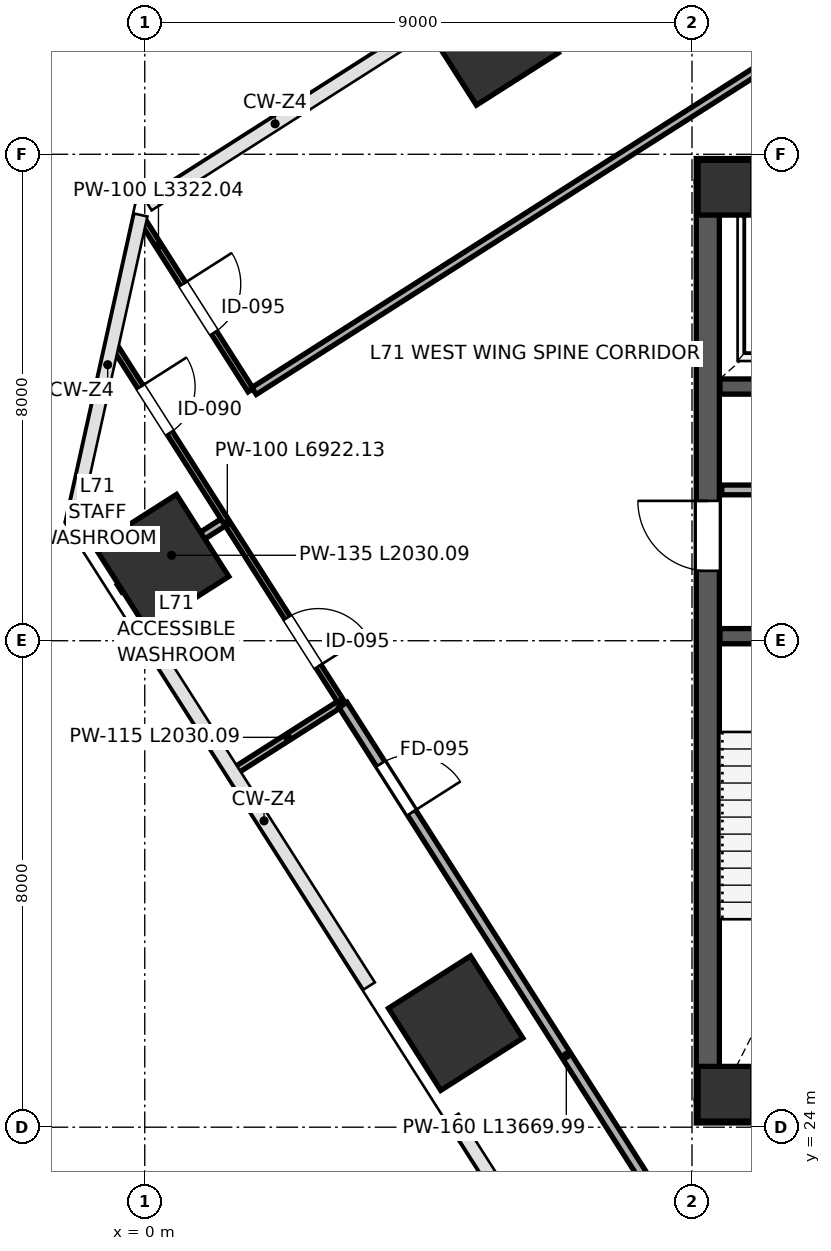
"""IFC4 building model, lengths in metres.
Left out: names, types, materials, properties, quantities, classifications, styles, units other than length and angle.
Written with IfcOpenShell. Run it as: python <this file> out.ifc"""

import sys

from ifc_helpers import new_model, si_unit, direction, frame, frame_2d, origin, origin_2d, place, context, subcontext, project, spatial, rectangle, extrude, source, transform, mapped, element, fill, save


model = new_model("IFC4")
c1 = context("Model", 3, precision=1e-05, world=origin(), true_north=direction((0.0, 1.0)))
c2 = subcontext(c1, "Body", "Model", "MODEL_VIEW")
j1 = project(units=[si_unit("LENGTHUNIT", "METRE"), si_unit("PLANEANGLEUNIT", "RADIAN")], contexts=[c1])
p1 = place(None, origin())
s1 = spatial("IfcSite", under=j1, at=p1, CompositionType="ELEMENT")
p2 = place(p1, origin())
s2 = spatial("IfcBuilding", under=s1, at=p2, CompositionType="ELEMENT")
p3 = place(p2, frame((0.0, 0.0, 315.6)))
s3 = spatial("IfcBuildingStorey", under=s2, at=p3, CompositionType="ELEMENT", Elevation=315.6)
m1 = source(origin(), c2, "Body", "SweptSolid", [
    extrude(rectangle(XDim=0.9, YDim=0.9, at=origin_2d()), origin(), (0.0, 0.0, 1.0), 4.198),
])
for number, where, z_axis, x_axis in (
    (1, (9.55, 24.55, 0.001), (0.0, 0.0, 1.0), (1.0, 0.0, 0.0)),
    (2, (9.55, 39.45, 0.001), (0.0, 0.0, 1.0), (1.0, 0.0, 0.0)),
):
    element("IfcColumn", number, at=place(p3, frame(where, z_axis=z_axis, x_axis=x_axis)), inside=s3, PredefinedType="COLUMN", context=c2, shape_type="MappedRepresentation", body=[
        mapped(m1, transform((0.0, 0.0, 0.0), scale=1.0)),
    ])
m2 = source(origin(), c2, "Body", "SweptSolid", [
    extrude(rectangle(XDim=1.6, YDim=1.6, at=origin_2d()), origin(), (0.0, 0.0, 1.0), 4.198),
])
for number, where, z_axis, x_axis in (
    (3, (0.277, 33.301, 0.001), (0.0, 0.0, 1.0), (-0.537, 0.843, 0.0)),
    (4, (5.113, 25.71, 0.001), (0.0, 0.0, 1.0), (-0.537, 0.843, 0.0)),
    (5, (5.699, 41.913, 0.001), (0.0, 0.0, 1.0), (-0.537, 0.843, 0.0)),
):
    element("IfcColumn", number, at=place(p3, frame(where, z_axis=z_axis, x_axis=x_axis)), inside=s3, PredefinedType="COLUMN", context=c2, shape_type="MappedRepresentation", body=[
        mapped(m2, transform((0.0, 0.0, 0.0), scale=1.0)),
    ])
p4 = place(p3, frame((9.26, 24.45, 0.0), z_axis=(0.0, 0.0, 1.0), x_axis=(0.0, 1.0, 0.0)))
e6 = element("IfcWall", 6, at=p4, inside=s3, PredefinedType="SHEAR", context=c2, shape_type="SweptSolid", body=[
    extrude(rectangle(XDim=15.1, YDim=0.38, at=frame_2d((7.55, 0.0))), origin(), (0.0, 0.0, 1.0), 3.96),
])
p5 = place(p4, frame((8.7, 0.0, 0.0)))
e7 = element("IfcOpeningElement", 7, at=p5, cuts=e6, PredefinedType="OPENING", context=c2, shape_type="SweptSolid", body=[
    extrude(rectangle(XDim=1.15, YDim=2.2, at=frame_2d((0.575, 1.1))), frame((0.0, 0.2, 0.0), z_axis=(0.0, -1.0, 0.0), x_axis=(1.0, 0.0, 0.0)), (0.0, 0.0, 1.0), 0.4),
])
for number, where, z_axis, x_axis in (
    (8, (9.07, 24.26, 0.0), (0.0, 0.0, 1.0), (1.0, 0.0, 0.0)),
    (9, (9.07, 39.74, 0.0), (0.0, 0.0, 1.0), (1.0, 0.0, 0.0)),
):
    element("IfcWall", number, at=place(p3, frame(where, z_axis=z_axis, x_axis=x_axis)), inside=s3, PredefinedType="SHEAR", context=c2, shape_type="SweptSolid", body=[
        extrude(rectangle(XDim=17.86, YDim=0.38, at=frame_2d((8.93, 0.0))), origin(), (0.0, 0.0, 1.0), 3.96),
    ])
p6 = place(p3, frame((9.46, 32.075, 0.0), z_axis=(0.0, 0.0, 1.0), x_axis=(1.0, 0.0, 0.0)))
e10 = element("IfcWall", 10, at=p6, inside=s3, PredefinedType="SHEAR", context=c2, shape_type="SweptSolid", body=[
    extrude(rectangle(XDim=3.29, YDim=0.25, at=frame_2d((1.645, 0.0))), origin(), (0.0, 0.0, 1.0), 3.96),
])
p7 = place(p3, frame((9.46, 36.18, 0.0), z_axis=(0.0, 0.0, 1.0), x_axis=(1.0, 0.0, 0.0)))
e11 = element("IfcWall", 11, at=p7, inside=s3, PredefinedType="SHEAR", context=c2, shape_type="SweptSolid", body=[
    extrude(rectangle(XDim=3.79, YDim=0.25, at=frame_2d((1.895, 0.0))), origin(), (0.0, 0.0, 1.0), 3.96),
])
p8 = place(p7, frame((2.62, 0.0, 0.0)))
e12 = element("IfcOpeningElement", 12, at=p8, cuts=e11, PredefinedType="OPENING", context=c2, shape_type="SweptSolid", body=[
    extrude(rectangle(XDim=0.85, YDim=2.1, at=frame_2d((0.425, 1.05))), frame((0.0, 0.135, 0.0), z_axis=(0.0, -1.0, 0.0), x_axis=(1.0, 0.0, 0.0)), (0.0, 0.0, 1.0), 0.27),
])
p9 = place(p7, frame((0.85, 0.0, 0.0)))
e13 = element("IfcOpeningElement", 13, at=p9, cuts=e11, PredefinedType="OPENING", context=c2, shape_type="SweptSolid", body=[
    extrude(rectangle(XDim=1.3, YDim=2.25, at=frame_2d((0.65, 1.125))), frame((0.0, 0.135, 0.0), z_axis=(0.0, -1.0, 0.0), x_axis=(1.0, 0.0, 0.0)), (0.0, 0.0, 1.0), 0.27),
])
p10 = place(p3, frame((9.49, 34.48, 0.0), z_axis=(0.0, 0.0, 1.0), x_axis=(1.0, 0.0, 0.0)))
e14 = element("IfcWall", 14, at=p10, inside=s3, PredefinedType="PARTITIONING", context=c2, shape_type="SweptSolid", body=[
    extrude(rectangle(XDim=3.7, YDim=0.16, at=frame_2d((1.85, 0.0))), origin(), (0.0, 0.0, 1.0), 3.96),
])
p11 = place(p10, frame((1.15, 0.0, 0.0)))
e15 = element("IfcOpeningElement", 15, at=p11, cuts=e14, PredefinedType="OPENING", context=c2, shape_type="SweptSolid", body=[
    extrude(rectangle(XDim=0.9, YDim=2.15, at=frame_2d((0.45, 1.075))), frame((0.0, 0.09, 0.0), z_axis=(0.0, -1.0, 0.0), x_axis=(1.0, 0.0, 0.0)), (0.0, 0.0, 1.0), 0.18),
])
p12 = place(p3, frame((-0.414, 32.86, 0.0), z_axis=(0.0, 0.0, 1.0), x_axis=(0.843468317829, 0.5371789244, 0.0)))
e16 = element("IfcWall", 16, at=p12, inside=s3, PredefinedType="PARTITIONING", context=c2, shape_type="SweptSolid", body=[
    extrude(rectangle(XDim=2.03, YDim=0.135, at=frame_2d((1.015, 0.0))), origin(), (0.0, 0.0, 1.0), 3.295),
])
p13 = place(p3, frame((1.493, 29.866, 0.0), z_axis=(0.0, 0.0, 1.0), x_axis=(0.843433611632, 0.537233415537, 0.0)))
e17 = element("IfcWall", 17, at=p13, inside=s3, PredefinedType="PARTITIONING", context=c2, shape_type="SweptSolid", body=[
    extrude(rectangle(XDim=2.03, YDim=0.115, at=frame_2d((1.015, 0.0))), origin(), (0.0, 0.0, 1.0), 3.295),
])
p14 = place(p3, frame((-0.502, 36.85, 0.0), z_axis=(0.0, 0.0, 1.0), x_axis=(0.537309039539, -0.843385437407, 0.0)))
e18 = element("IfcWall", 18, at=p14, inside=s3, PredefinedType="PARTITIONING", context=c2, shape_type="SweptSolid", body=[
    extrude(rectangle(XDim=6.922, YDim=0.1, at=frame_2d((3.461, 0.0))), origin(), (0.0, 0.0, 1.0), 3.96),
])
p15 = place(p14, frame((0.8, 0.0, 0.0)))
e19 = element("IfcOpeningElement", 19, at=p15, cuts=e18, PredefinedType="OPENING", context=c2, shape_type="SweptSolid", body=[
    extrude(rectangle(XDim=0.9, YDim=2.15, at=frame_2d((0.45, 1.075))), frame((0.0, 0.06, 0.0), z_axis=(0.0, -1.0, 0.0), x_axis=(1.0, 0.0, 0.0)), (0.0, 0.0, 1.0), 0.12),
])
p16 = place(p14, frame((5.3, 0.0, 0.0)))
e20 = element("IfcOpeningElement", 20, at=p16, cuts=e18, PredefinedType="OPENING", context=c2, shape_type="SweptSolid", body=[
    extrude(rectangle(XDim=0.95, YDim=2.15, at=frame_2d((0.475, 1.075))), frame((0.0, 0.06, 0.0), z_axis=(0.0, -1.0, 0.0), x_axis=(1.0, 0.0, 0.0)), (0.0, 0.0, 1.0), 0.12),
])
p17 = place(p3, frame((3.26, 30.945, 0.0), z_axis=(0.0, 0.0, 1.0), x_axis=(0.537307625317, -0.843386338386, 0.0)))
e21 = element("IfcWall", 21, at=p17, inside=s3, PredefinedType="PARTITIONING", context=c2, shape_type="SweptSolid", body=[
    extrude(rectangle(XDim=13.67, YDim=0.16, at=frame_2d((6.835, 0.0))), origin(), (0.0, 0.0, 1.0), 3.96),
])
p18 = place(p17, frame((1.15, 0.0, 0.0)))
e22 = element("IfcOpeningElement", 22, at=p18, cuts=e21, PredefinedType="OPENING", context=c2, shape_type="SweptSolid", body=[
    extrude(rectangle(XDim=0.95, YDim=2.15, at=frame_2d((0.475, 1.075))), frame((0.0, 0.09, 0.0), z_axis=(0.0, -1.0, 0.0), x_axis=(1.0, 0.0, 0.0)), (0.0, 0.0, 1.0), 0.18),
])
p19 = place(p3, frame((-0.042, 38.921, 0.0), z_axis=(0.0, 0.0, 1.0), x_axis=(0.537298651026, -0.843392055693, 0.0)))
e23 = element("IfcWall", 23, at=p19, inside=s3, PredefinedType="PARTITIONING", context=c2, shape_type="SweptSolid", body=[
    extrude(rectangle(XDim=3.322, YDim=0.1, at=frame_2d((1.661, 0.0))), origin(), (0.0, 0.0, 1.0), 3.96),
])
p20 = place(p19, frame((1.25, 0.0, 0.0)))
e24 = element("IfcOpeningElement", 24, at=p20, cuts=e23, PredefinedType="OPENING", context=c2, shape_type="SweptSolid", body=[
    extrude(rectangle(XDim=0.95, YDim=2.15, at=frame_2d((0.475, 1.075))), frame((0.0, 0.06, 0.0), z_axis=(0.0, -1.0, 0.0), x_axis=(1.0, 0.0, 0.0)), (0.0, 0.0, 1.0), 0.12),
])
p21 = place(p3, frame((1.798, 36.107, 0.0), z_axis=(0.0, 0.0, 1.0), x_axis=(0.843396745572, 0.537291289301, 0.0)))
e25 = element("IfcWall", 25, at=p21, inside=s3, PredefinedType="PARTITIONING", context=c2, shape_type="SweptSolid", body=[
    extrude(rectangle(XDim=17.17, YDim=0.135, at=frame_2d((8.585, 0.0))), origin(), (0.0, 0.0, 1.0), 3.96),
])
p22 = place(p3, frame((9.687, 17.004, 0.0), z_axis=(0.0, 0.0, 1.0), x_axis=(0.843392646996, 0.537297722862, 0.0)))
e26 = element("IfcWall", 26, at=p22, inside=s3, PredefinedType="PARTITIONING", context=c2, shape_type="SweptSolid", body=[
    extrude(rectangle(XDim=12.831, YDim=0.16, at=frame_2d((6.416, 0.0))), origin(), (0.0, 0.0, 1.0), 3.96),
])
m3 = source(origin(), c2, "Body", "SweptSolid", [
    extrude(rectangle(XDim=1.15, YDim=2.2, at=frame_2d((0.575, 1.1))), frame((0.0, 0.025, 0.0), z_axis=(0.0, -1.0, 0.0), x_axis=(1.0, 0.0, 0.0)), (0.0, 0.0, 1.0), 0.05),
])
p23 = place(p5, origin())
e27 = element("IfcDoor", 27, at=p23, inside=s3, OperationType="SINGLE_SWING_RIGHT", PredefinedType="DOOR", context=c2, shape_type="MappedRepresentation", body=[
    mapped(m3, transform((0.0, 0.0, 0.0), scale=1.0)),
])
fill(e7, e27)
m4 = source(origin(), c2, "Body", "SweptSolid", [
    extrude(rectangle(XDim=0.9, YDim=2.15, at=frame_2d((0.45, 1.075))), frame((0.0, 0.025, 0.0), z_axis=(0.0, -1.0, 0.0), x_axis=(1.0, 0.0, 0.0)), (0.0, 0.0, 1.0), 0.05),
])
p24 = place(p15, origin())
e28 = element("IfcDoor", 28, at=p24, inside=s3, OperationType="SINGLE_SWING_LEFT", PredefinedType="DOOR", context=c2, shape_type="MappedRepresentation", body=[
    mapped(m4, transform((0.0, 0.0, 0.0), scale=1.0)),
])
fill(e19, e28)
m5 = source(origin(), c2, "Body", "SweptSolid", [
    extrude(rectangle(XDim=0.95, YDim=2.15, at=frame_2d((0.475, 1.075))), frame((0.0, 0.025, 0.0), z_axis=(0.0, -1.0, 0.0), x_axis=(1.0, 0.0, 0.0)), (0.0, 0.0, 1.0), 0.05),
])
p25 = place(p16, origin())
e29 = element("IfcDoor", 29, at=p25, inside=s3, OperationType="SINGLE_SWING_RIGHT", PredefinedType="DOOR", context=c2, shape_type="MappedRepresentation", body=[
    mapped(m5, transform((0.0, 0.0, 0.0), scale=1.0)),
])
fill(e20, e29)
m6 = source(origin(), c2, "Body", "SweptSolid", [
    extrude(rectangle(XDim=0.95, YDim=2.15, at=frame_2d((0.475, 1.075))), frame((0.0, 0.025, 0.0), z_axis=(0.0, -1.0, 0.0), x_axis=(1.0, 0.0, 0.0)), (0.0, 0.0, 1.0), 0.05),
])
p26 = place(p18, origin())
e30 = element("IfcDoor", 30, at=p26, inside=s3, OperationType="SINGLE_SWING_RIGHT", PredefinedType="DOOR", context=c2, shape_type="MappedRepresentation", body=[
    mapped(m6, transform((0.0, 0.0, 0.0), scale=1.0)),
])
fill(e22, e30)
p27 = place(p20, origin())
e31 = element("IfcDoor", 31, at=p27, inside=s3, OperationType="SINGLE_SWING_LEFT", PredefinedType="DOOR", context=c2, shape_type="MappedRepresentation", body=[
    mapped(m5, transform((0.0, 0.0, 0.0), scale=1.0)),
])
fill(e24, e31)
save(model, sys.argv[1])
